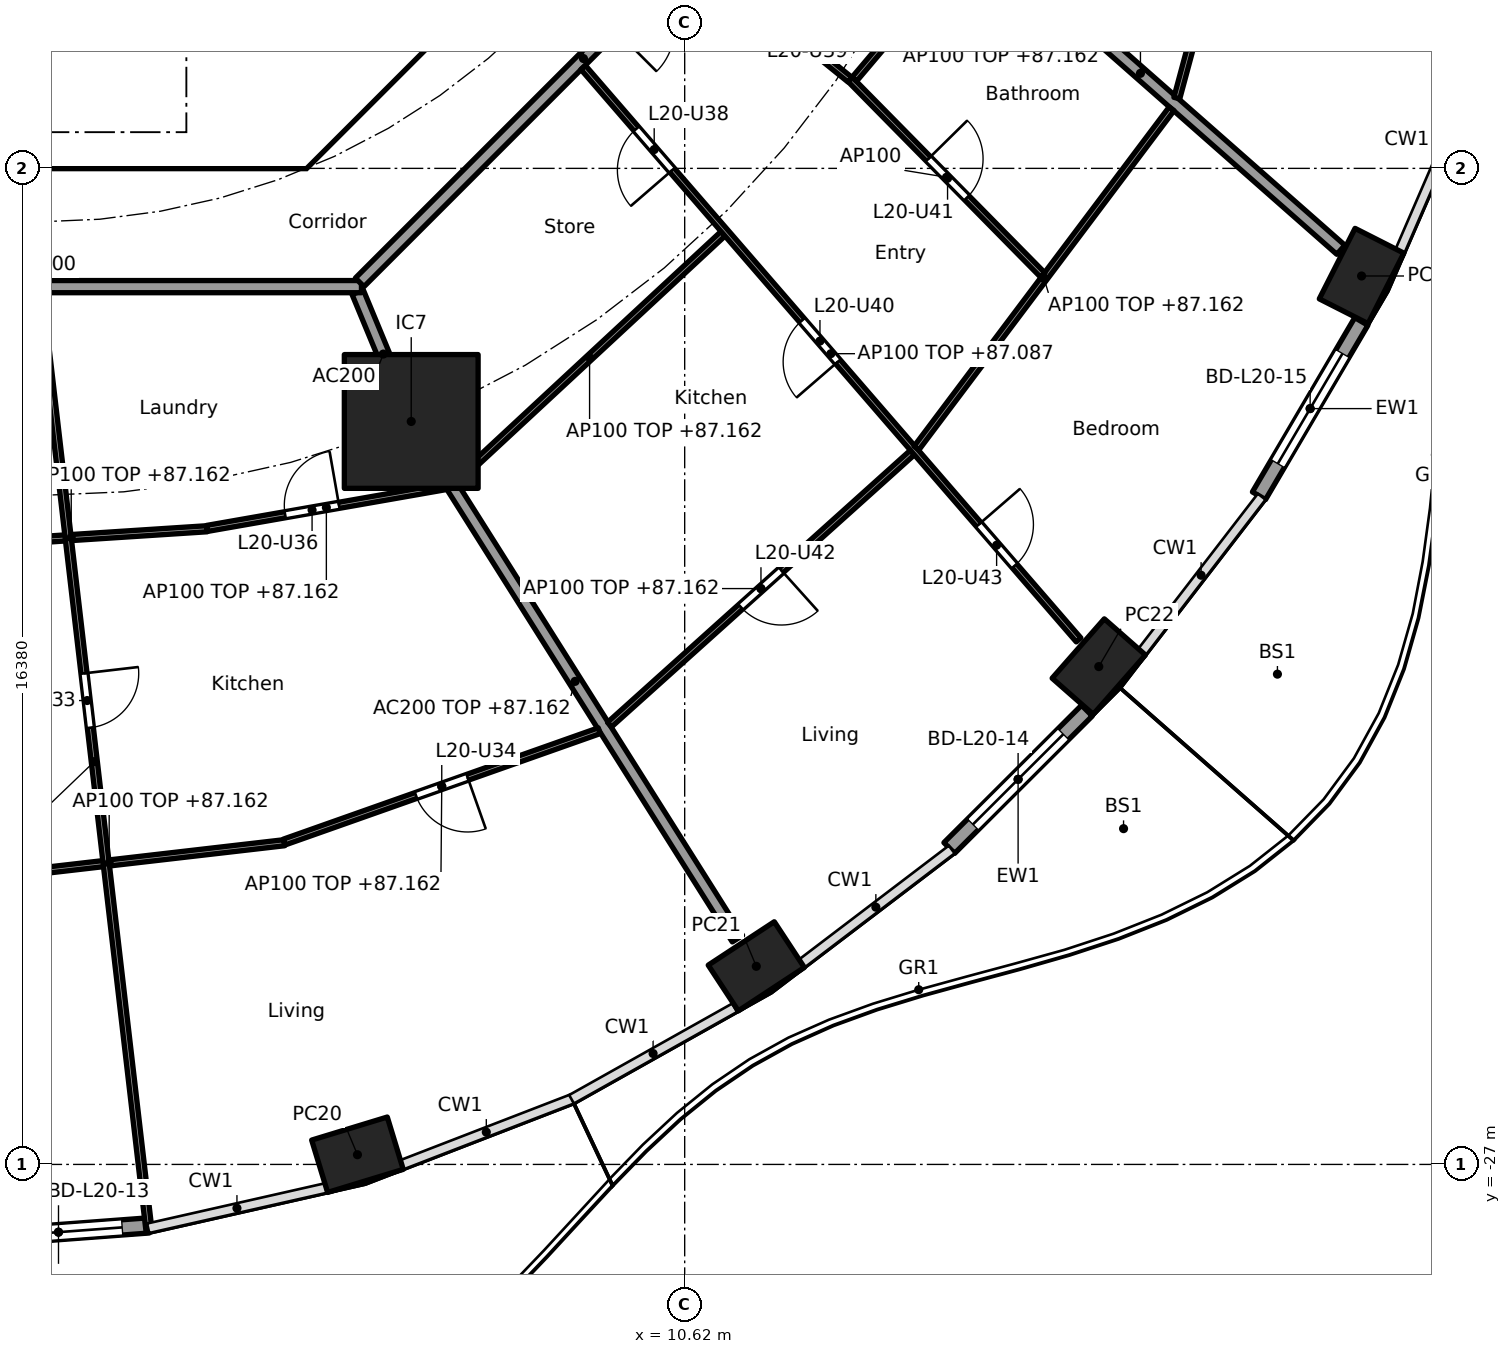
"""IFC4 building model, lengths in metres.
Left out: names, types, materials, properties, quantities, classifications, styles, units other than length and angle.
Written with IfcOpenShell. Run it as: python <this file> out.ifc"""

import sys

from ifc_helpers import new_model, si_unit, direction, frame, frame_2d, origin, origin_2d, place, context, subcontext, project, spatial, polyline, rectangle, hollow_rectangle, outline, extrude, element, fill, save


model = new_model("IFC4")
c1 = context("Model", 3, precision=1e-05, world=origin(), true_north=direction((0.0, 1.0)))
c2 = subcontext(c1, "Body", "Model", "MODEL_VIEW")
j1 = project(units=[si_unit("LENGTHUNIT", "METRE"), si_unit("PLANEANGLEUNIT", "RADIAN")], contexts=[c1])
p1 = place(None, origin())
s1 = spatial("IfcSite", under=j1, at=p1, CompositionType="ELEMENT")
p2 = place(p1, origin())
s2 = spatial("IfcBuilding", under=s1, at=p2, CompositionType="ELEMENT")
p3 = place(p2, frame((0.0, 0.0, 84.4)))
s3 = spatial("IfcBuildingStorey", under=s2, at=p3, CompositionType="ELEMENT", Elevation=84.4)
for number, where, z_axis, x_axis in (
    (1, (5.239, -26.841, 0.0), (0.0, 0.0, 1.0), (0.957, 0.292, 0.0)),
    (2, (11.798, -23.742, 0.0), (0.0, 0.0, 1.0), (0.836, 0.549, 0.0)),
    (3, (17.43, -18.813, 0.0), (0.0, 0.0, 1.0), (0.66, 0.751, 0.0)),
    (4, (21.751, -12.39, 0.0), (0.0, 0.0, 1.0), (0.452, 0.892, 0.0)),
):
    element("IfcColumn", number, at=place(p3, frame(where, z_axis=z_axis, x_axis=x_axis)), inside=s3, PredefinedType="COLUMN", context=c2, shape_type="SweptSolid", body=[
        extrude(hollow_rectangle(XDim=1.3, YDim=0.9, WallThickness=0.045, at=origin_2d()), origin(), (0.0, 0.0, 1.0), 3.7),
    ])
p4 = place(p3, frame((6.123, -14.782, 0.0), z_axis=(0.0, 0.0, 1.0), x_axis=(1.0, 0.0, 0.0)))
e5 = element("IfcColumn", 5, at=p4, inside=s3, PredefinedType="COLUMN", context=c2, shape_type="SweptSolid", body=[
    extrude(rectangle(XDim=2.2, YDim=2.2, at=origin_2d()), origin(), (0.0, 0.0, 1.0), 3.7),
])
p5 = place(p3, frame((1.806, -28.003, 0.0), z_axis=(0.0, 0.0, 1.0), x_axis=(-0.997226174467, -0.074430887117, 0.0)))
e6 = element("IfcWall", 6, at=p5, inside=s3, PredefinedType="SOLIDWALL", context=c2, shape_type="SweptSolid", body=[
    extrude(rectangle(XDim=2.975, YDim=0.25, at=frame_2d((1.488, 0.0))), origin(), (0.0, 0.0, 1.0), 3.44),
])
p6 = place(p5, frame((0.438, 0.0, 0.0)))
e7 = element("IfcOpeningElement", 7, at=p6, cuts=e6, PredefinedType="OPENING", context=c2, shape_type="SweptSolid", body=[
    extrude(rectangle(XDim=2.1, YDim=2.4, at=frame_2d((1.05, 1.2))), frame((0.0, 0.135, 0.0), z_axis=(0.0, -1.0, 0.0), x_axis=(1.0, 0.0, 0.0)), (0.0, 0.0, 1.0), 0.27),
])
p7 = place(p3, frame((17.235, -19.537, 0.0), z_axis=(0.0, 0.0, 1.0), x_axis=(-0.707793551437, -0.706419343269, 0.0)))
e8 = element("IfcWall", 8, at=p7, inside=s3, PredefinedType="SOLIDWALL", context=c2, shape_type="SweptSolid", body=[
    extrude(rectangle(XDim=3.198, YDim=0.25, at=frame_2d((1.599, 0.0))), origin(), (0.0, 0.0, 1.0), 3.44),
])
p8 = place(p7, frame((0.549, 0.0, 0.0)))
e9 = element("IfcOpeningElement", 9, at=p8, cuts=e8, PredefinedType="OPENING", context=c2, shape_type="SweptSolid", body=[
    extrude(rectangle(XDim=2.1, YDim=2.4, at=frame_2d((1.05, 1.2))), frame((0.0, 0.135, 0.0), z_axis=(0.0, -1.0, 0.0), x_axis=(1.0, 0.0, 0.0)), (0.0, 0.0, 1.0), 0.27),
])
p9 = place(p3, frame((21.748, -13.137, 0.0), z_axis=(0.0, 0.0, 1.0), x_axis=(-0.506297921217, -0.862358634775, 0.0)))
e10 = element("IfcWall", 10, at=p9, inside=s3, PredefinedType="SOLIDWALL", context=c2, shape_type="SweptSolid", body=[
    extrude(rectangle(XDim=3.325, YDim=0.25, at=frame_2d((1.662, 0.0))), origin(), (0.0, 0.0, 1.0), 3.44),
])
p10 = place(p9, frame((0.612, 0.0, 0.0)))
e11 = element("IfcOpeningElement", 11, at=p10, cuts=e10, PredefinedType="OPENING", context=c2, shape_type="SweptSolid", body=[
    extrude(rectangle(XDim=2.1, YDim=2.4, at=frame_2d((1.05, 1.2))), frame((0.0, 0.135, 0.0), z_axis=(0.0, -1.0, 0.0), x_axis=(1.0, 0.0, 0.0)), (0.0, 0.0, 1.0), 0.27),
])
p11 = place(p3, frame((4.613, -9.988, 0.0), z_axis=(0.0, 0.0, 1.0), x_axis=(0.707106781187, 0.707106781187, 0.0)))
e12 = element("IfcWall", 12, at=p11, inside=s3, PredefinedType="SHEAR", context=c2, shape_type="SweptSolid", body=[
    extrude(rectangle(XDim=7.602, YDim=0.6, at=frame_2d((3.801, 0.0))), origin(), (0.0, 0.0, 1.0), 3.44),
])
p12 = place(p11, frame((3.201, 0.0, 0.0)))
e13 = element("IfcOpeningElement", 13, at=p12, cuts=e12, PredefinedType="OPENING", context=c2, shape_type="SweptSolid", body=[
    extrude(rectangle(XDim=1.2, YDim=2.1, at=frame_2d((0.6, 1.05))), frame((0.0, 0.31, 0.0), z_axis=(0.0, -1.0, 0.0), x_axis=(1.0, 0.0, 0.0)), (0.0, 0.0, 1.0), 0.62),
])
p13 = place(p3, frame((4.0, -10.025, 0.0), z_axis=(0.0, 0.0, 1.0), x_axis=(0.0, 1.0, 0.0)))
e14 = element("IfcWall", 14, at=p13, inside=s3, PredefinedType="SOLIDWALL", context=c2, shape_type="SweptSolid", body=[
    extrude(rectangle(XDim=3.0, YDim=0.2, at=frame_2d((1.5, 0.0))), origin(), (0.0, 0.0, 1.0), 3.44),
])
p14 = place(p13, frame((0.975, 0.0, 0.0)))
e15 = element("IfcOpeningElement", 15, at=p14, cuts=e14, PredefinedType="OPENING", context=c2, shape_type="SweptSolid", body=[
    extrude(rectangle(XDim=1.1, YDim=2.1, at=frame_2d((0.55, 1.05))), frame((0.0, 0.11, 0.0), z_axis=(0.0, -1.0, 0.0), x_axis=(1.0, 0.0, 0.0)), (0.0, 0.0, 1.0), 0.22),
])
p15 = place(p3, origin())
e16 = element("IfcWall", 16, at=p15, inside=s3, PredefinedType="SHEAR", context=c2, shape_type="SweptSolid", body=[
    extrude(outline(polyline([(-4.152, -10.025), (4.152, -10.025), (4.401, -9.776), (4.825, -10.2), (4.401, -10.625), (-4.401, -10.625), (-4.825, -10.2), (-4.401, -9.776), (-4.152, -10.025)])), origin(), (0.0, 0.0, 1.0), 3.44),
])
p16 = place(p3, frame((5.243, -12.657, 0.0), z_axis=(0.0, 0.0, 1.0), x_axis=(0.382747093259, -0.923853160736, 0.0)))
e17 = element("IfcWall", 17, at=p16, inside=s3, PredefinedType="PARTITIONING", context=c2, shape_type="SweptSolid", body=[
    extrude(rectangle(XDim=2.2, YDim=0.2, at=frame_2d((1.1, 0.0))), origin(), (0.0, 0.0, 1.0), 3.44),
])
p17 = place(p3, frame((6.15, -14.824, 0.0), z_axis=(0.0, 0.0, 1.0), x_axis=(0.533492589682, -0.845804739142, 0.0)))
e18 = element("IfcWall", 18, at=p17, inside=s3, PredefinedType="PARTITIONING", context=c2, shape_type="SweptSolid", body=[
    extrude(rectangle(XDim=10.006, YDim=0.2, at=frame_2d((5.003, 0.0))), origin(), (0.0, 0.0, 1.0), 2.762),
])
p18 = place(p3, frame((14.82, -6.156, 0.0), z_axis=(0.0, 0.0, 1.0), x_axis=(0.750582231659, -0.660777052808, 0.0)))
e19 = element("IfcWall", 19, at=p18, inside=s3, PredefinedType="PARTITIONING", context=c2, shape_type="SweptSolid", body=[
    extrude(rectangle(XDim=8.781, YDim=0.2, at=frame_2d((4.391, 0.0))), origin(), (0.0, 0.0, 1.0), 2.762),
])
p19 = place(p3, frame((-5.104, -12.565, 0.0), z_axis=(0.0, 0.0, 1.0), x_axis=(1.0, 0.0, 0.0)))
e20 = element("IfcWall", 20, at=p19, inside=s3, PredefinedType="PARTITIONING", context=c2, shape_type="SweptSolid", body=[
    extrude(rectangle(XDim=10.409, YDim=0.2, at=frame_2d((5.205, 0.0))), origin(), (0.0, 0.0, 1.0), 3.44),
])
p20 = place(p3, frame((5.275, -12.494, 0.0), z_axis=(0.0, 0.0, 1.0), x_axis=(0.707106781187, 0.707106781187, 0.0)))
e21 = element("IfcWall", 21, at=p20, inside=s3, PredefinedType="PARTITIONING", context=c2, shape_type="SweptSolid", body=[
    extrude(rectangle(XDim=10.409, YDim=0.2, at=frame_2d((5.205, 0.0))), origin(), (0.0, 0.0, 1.0), 3.44),
])
p21 = place(p20, frame((5.906, 0.0, 0.0)))
e22 = element("IfcOpeningElement", 22, at=p21, cuts=e21, PredefinedType="OPENING", context=c2, shape_type="SweptSolid", body=[
    extrude(rectangle(XDim=1.0, YDim=2.1, at=frame_2d((0.5, 1.05))), frame((0.0, 0.11, 0.0), z_axis=(0.0, -1.0, 0.0), x_axis=(1.0, 0.0, 0.0)), (0.0, 0.0, 1.0), 0.22),
])
p22 = place(p3, frame((-1.703, -16.836, 0.0), z_axis=(0.0, 0.0, 1.0), x_axis=(0.997899919101, 0.064774620473, 0.0)))
e23 = element("IfcWall", 23, at=p22, inside=s3, PredefinedType="PARTITIONING", context=c2, shape_type="SweptSolid", body=[
    extrude(rectangle(XDim=4.478, YDim=0.1, at=frame_2d((2.239, 0.0))), origin(), (0.0, 0.0, 1.0), 2.762),
])
p23 = place(p3, frame((-1.726, -22.375, 0.0), z_axis=(0.0, 0.0, 1.0), x_axis=(0.993392336919, 0.114767874207, 0.0)))
e24 = element("IfcWall", 24, at=p23, inside=s3, PredefinedType="PARTITIONING", context=c2, shape_type="SweptSolid", body=[
    extrude(rectangle(XDim=5.801, YDim=0.1, at=frame_2d((2.9, 0.0))), origin(), (0.0, 0.0, 1.0), 2.762),
])
p24 = place(p3, frame((0.011, -12.664, 0.0), z_axis=(0.0, 0.0, 1.0), x_axis=(0.115841404661, -0.993267722704, 0.0)))
e25 = element("IfcWall", 25, at=p24, inside=s3, PredefinedType="PARTITIONING", context=c2, shape_type="SweptSolid", body=[
    extrude(rectangle(XDim=15.528, YDim=0.1, at=frame_2d((7.764, 0.0))), origin(), (0.0, 0.0, 1.0), 2.687),
])
p25 = place(p24, frame((6.303, 0.0, 0.0)))
e26 = element("IfcOpeningElement", 26, at=p25, cuts=e25, PredefinedType="OPENING", context=c2, shape_type="SweptSolid", body=[
    extrude(rectangle(XDim=0.9, YDim=2.1, at=frame_2d((0.45, 1.05))), frame((0.0, 0.06, 0.0), z_axis=(0.0, -1.0, 0.0), x_axis=(1.0, 0.0, 0.0)), (0.0, 0.0, 1.0), 0.12),
])
p26 = place(p3, frame((2.765, -16.541, 0.0), z_axis=(0.0, 0.0, 1.0), x_axis=(0.984998714702, 0.172561676036, 0.0)))
e27 = element("IfcWall", 27, at=p26, inside=s3, PredefinedType="PARTITIONING", context=c2, shape_type="SweptSolid", body=[
    extrude(rectangle(XDim=3.984, YDim=0.1, at=frame_2d((1.992, 0.0))), origin(), (0.0, 0.0, 1.0), 2.762),
])
p27 = place(p26, frame((1.304, 0.0, 0.0)))
e28 = element("IfcOpeningElement", 28, at=p27, cuts=e27, PredefinedType="OPENING", context=c2, shape_type="SweptSolid", body=[
    extrude(rectangle(XDim=0.9, YDim=2.1, at=frame_2d((0.45, 1.05))), frame((0.0, 0.06, 0.0), z_axis=(0.0, -1.0, 0.0), x_axis=(1.0, 0.0, 0.0)), (0.0, 0.0, 1.0), 0.12),
])
p28 = place(p3, frame((4.034, -21.698, 0.0), z_axis=(0.0, 0.0, 1.0), x_axis=(0.942861482644, 0.33318497047, 0.0)))
e29 = element("IfcWall", 29, at=p28, inside=s3, PredefinedType="PARTITIONING", context=c2, shape_type="SweptSolid", body=[
    extrude(rectangle(XDim=5.495, YDim=0.1, at=frame_2d((2.748, 0.0))), origin(), (0.0, 0.0, 1.0), 2.762),
])
p29 = place(p28, frame((2.297, 0.0, 0.0)))
e30 = element("IfcOpeningElement", 30, at=p29, cuts=e29, PredefinedType="OPENING", context=c2, shape_type="SweptSolid", body=[
    extrude(rectangle(XDim=0.9, YDim=2.1, at=frame_2d((0.45, 1.05))), frame((0.0, 0.06, 0.0), z_axis=(0.0, -1.0, 0.0), x_axis=(1.0, 0.0, 0.0)), (0.0, 0.0, 1.0), 0.12),
])
p30 = place(p3, frame((6.861, -15.768, 0.0), z_axis=(0.0, 0.0, 1.0), x_axis=(0.733011256509, 0.680216508056, 0.0)))
e31 = element("IfcWall", 31, at=p30, inside=s3, PredefinedType="PARTITIONING", context=c2, shape_type="SweptSolid", body=[
    extrude(rectangle(XDim=5.989, YDim=0.1, at=frame_2d((2.994, 0.0))), origin(), (0.0, 0.0, 1.0), 2.762),
])
p31 = place(p3, frame((9.384, -19.768, 0.0), z_axis=(0.0, 0.0, 1.0), x_axis=(0.74387407395, 0.668319805262, 0.0)))
e32 = element("IfcWall", 32, at=p31, inside=s3, PredefinedType="PARTITIONING", context=c2, shape_type="SweptSolid", body=[
    extrude(rectangle(XDim=6.695, YDim=0.1, at=frame_2d((3.348, 0.0))), origin(), (0.0, 0.0, 1.0), 2.762),
])
p32 = place(p31, frame((2.898, 0.0, 0.0)))
e33 = element("IfcOpeningElement", 33, at=p32, cuts=e32, PredefinedType="OPENING", context=c2, shape_type="SweptSolid", body=[
    extrude(rectangle(XDim=0.9, YDim=2.1, at=frame_2d((0.45, 1.05))), frame((0.0, 0.06, 0.0), z_axis=(0.0, -1.0, 0.0), x_axis=(1.0, 0.0, 0.0)), (0.0, 0.0, 1.0), 0.12),
])
p33 = place(p3, frame((8.95, -8.96, 0.0), z_axis=(0.0, 0.0, 1.0), x_axis=(0.65441081073, -0.756139200676, 0.0)))
e34 = element("IfcWall", 34, at=p33, inside=s3, PredefinedType="PARTITIONING", context=c2, shape_type="SweptSolid", body=[
    extrude(rectangle(XDim=12.451, YDim=0.1, at=frame_2d((6.226, 0.0))), origin(), (0.0, 0.0, 1.0), 2.687),
])
p34 = place(p33, frame((1.336, 0.0, 0.0)))
e35 = element("IfcOpeningElement", 35, at=p34, cuts=e34, PredefinedType="OPENING", context=c2, shape_type="SweptSolid", body=[
    extrude(rectangle(XDim=0.9, YDim=2.1, at=frame_2d((0.45, 1.05))), frame((0.0, 0.06, 0.0), z_axis=(0.0, -1.0, 0.0), x_axis=(1.0, 0.0, 0.0)), (0.0, 0.0, 1.0), 0.12),
])
p35 = place(p33, frame((5.501, 0.0, 0.0)))
e36 = element("IfcOpeningElement", 36, at=p35, cuts=e34, PredefinedType="OPENING", context=c2, shape_type="SweptSolid", body=[
    extrude(rectangle(XDim=0.9, YDim=2.1, at=frame_2d((0.45, 1.05))), frame((0.0, 0.06, 0.0), z_axis=(0.0, -1.0, 0.0), x_axis=(1.0, 0.0, 0.0)), (0.0, 0.0, 1.0), 0.12),
])
p36 = place(p33, frame((9.941, 0.0, 0.0)))
e37 = element("IfcOpeningElement", 37, at=p36, cuts=e34, PredefinedType="OPENING", context=c2, shape_type="SweptSolid", body=[
    extrude(rectangle(XDim=0.9, YDim=2.1, at=frame_2d((0.45, 1.05))), frame((0.0, 0.06, 0.0), z_axis=(0.0, -1.0, 0.0), x_axis=(1.0, 0.0, 0.0)), (0.0, 0.0, 1.0), 0.12),
])
p37 = place(p3, frame((14.432, -15.219, 0.0), z_axis=(0.0, 0.0, 1.0), x_axis=(0.601001256685, 0.799248077548, 0.0)))
e38 = element("IfcWall", 38, at=p37, inside=s3, PredefinedType="PARTITIONING", context=c2, shape_type="SweptSolid", body=[
    extrude(rectangle(XDim=6.98, YDim=0.1, at=frame_2d((3.49, 0.0))), origin(), (0.0, 0.0, 1.0), 2.762),
])
p38 = place(p3, frame((10.802, -7.107, 0.0), z_axis=(0.0, 0.0, 1.0), x_axis=(0.776992142502, -0.62951029419, 0.0)))
e39 = element("IfcWall", 39, at=p38, inside=s3, PredefinedType="PARTITIONING", context=c2, shape_type="SweptSolid", body=[
    extrude(rectangle(XDim=3.263, YDim=0.1, at=frame_2d((1.631, 0.0))), origin(), (0.0, 0.0, 1.0), 2.687),
])
p39 = place(p38, frame((1.181, 0.0, 0.0)))
e40 = element("IfcOpeningElement", 40, at=p39, cuts=e39, PredefinedType="OPENING", context=c2, shape_type="SweptSolid", body=[
    extrude(rectangle(XDim=0.9, YDim=2.1, at=frame_2d((0.45, 1.05))), frame((0.0, 0.06, 0.0), z_axis=(0.0, -1.0, 0.0), x_axis=(1.0, 0.0, 0.0)), (0.0, 0.0, 1.0), 0.12),
])
p40 = place(p3, frame((13.341, -9.157, 0.0), z_axis=(0.0, 0.0, 1.0), x_axis=(0.701624526877, -0.712546856904, 0.0)))
e41 = element("IfcWall", 41, at=p40, inside=s3, PredefinedType="PARTITIONING", context=c2, shape_type="SweptSolid", body=[
    extrude(rectangle(XDim=4.515, YDim=0.1, at=frame_2d((2.258, 0.0))), origin(), (0.0, 0.0, 1.0), 3.44),
])
p41 = place(p40, frame((1.833, 0.0, 0.0)))
e42 = element("IfcOpeningElement", 42, at=p41, cuts=e41, PredefinedType="OPENING", context=c2, shape_type="SweptSolid", body=[
    extrude(rectangle(XDim=0.9, YDim=2.1, at=frame_2d((0.45, 1.05))), frame((0.0, 0.06, 0.0), z_axis=(0.0, -1.0, 0.0), x_axis=(1.0, 0.0, 0.0)), (0.0, 0.0, 1.0), 0.12),
])
p42 = place(p3, frame((13.409, -9.155, 0.0), z_axis=(0.0, 0.0, 1.0), x_axis=(0.646130325831, 0.763227097293, 0.0)))
e43 = element("IfcWall", 43, at=p42, inside=s3, PredefinedType="PARTITIONING", context=c2, shape_type="SweptSolid", body=[
    extrude(rectangle(XDim=3.084, YDim=0.1, at=frame_2d((1.542, 0.0))), origin(), (0.0, 0.0, 1.0), 2.762),
])
p43 = place(p3, frame((18.713, -9.464, 0.0), z_axis=(0.0, 0.0, 1.0), x_axis=(0.260279646259, 0.965533275316, 0.0)))
e44 = element("IfcWall", 44, at=p43, inside=s3, PredefinedType="PARTITIONING", context=c2, shape_type="SweptSolid", body=[
    extrude(rectangle(XDim=5.833, YDim=0.1, at=frame_2d((2.917, 0.0))), origin(), (0.0, 0.0, 1.0), 2.762),
])
p44 = place(p6, origin())
e45 = element("IfcDoor", 45, at=p44, inside=s3, OperationType="SLIDING_TO_LEFT", PredefinedType="DOOR", context=c2, shape_type="SweptSolid", body=[
    extrude(rectangle(XDim=2.1, YDim=2.4, at=frame_2d((1.05, 1.2))), frame((0.0, 0.025, 0.0), z_axis=(0.0, -1.0, 0.0), x_axis=(1.0, 0.0, 0.0)), (0.0, 0.0, 1.0), 0.05),
])
fill(e7, e45)
p45 = place(p8, origin())
e46 = element("IfcDoor", 46, at=p45, inside=s3, OperationType="SLIDING_TO_LEFT", PredefinedType="DOOR", context=c2, shape_type="SweptSolid", body=[
    extrude(rectangle(XDim=2.1, YDim=2.4, at=frame_2d((1.05, 1.2))), frame((0.0, 0.025, 0.0), z_axis=(0.0, -1.0, 0.0), x_axis=(1.0, 0.0, 0.0)), (0.0, 0.0, 1.0), 0.05),
])
fill(e9, e46)
p46 = place(p10, origin())
e47 = element("IfcDoor", 47, at=p46, inside=s3, OperationType="SLIDING_TO_LEFT", PredefinedType="DOOR", context=c2, shape_type="SweptSolid", body=[
    extrude(rectangle(XDim=2.1, YDim=2.4, at=frame_2d((1.05, 1.2))), frame((0.0, 0.025, 0.0), z_axis=(0.0, -1.0, 0.0), x_axis=(1.0, 0.0, 0.0)), (0.0, 0.0, 1.0), 0.05),
])
fill(e11, e47)
p47 = place(p14, origin())
e48 = element("IfcDoor", 48, at=p47, inside=s3, OperationType="SINGLE_SWING_LEFT", PredefinedType="DOOR", context=c2, shape_type="SweptSolid", body=[
    extrude(rectangle(XDim=1.1, YDim=2.1, at=frame_2d((0.55, 1.05))), frame((0.0, 0.025, 0.0), z_axis=(0.0, -1.0, 0.0), x_axis=(1.0, 0.0, 0.0)), (0.0, 0.0, 1.0), 0.05),
])
fill(e15, e48)
p48 = place(p25, origin())
e49 = element("IfcDoor", 49, at=p48, inside=s3, OperationType="SINGLE_SWING_LEFT", PredefinedType="DOOR", context=c2, shape_type="SweptSolid", body=[
    extrude(rectangle(XDim=0.9, YDim=2.1, at=frame_2d((0.45, 1.05))), frame((0.0, 0.025, 0.0), z_axis=(0.0, -1.0, 0.0), x_axis=(1.0, 0.0, 0.0)), (0.0, 0.0, 1.0), 0.05),
])
fill(e26, e49)
p49 = place(p29, frame((0.9, 0.0, 0.0), x_axis=(-1.0, 0.0, 0.0)))
e50 = element("IfcDoor", 50, at=p49, inside=s3, OperationType="SINGLE_SWING_LEFT", PredefinedType="DOOR", context=c2, shape_type="SweptSolid", body=[
    extrude(rectangle(XDim=0.9, YDim=2.1, at=frame_2d((0.45, 1.05))), frame((0.0, 0.025, 0.0), z_axis=(0.0, -1.0, 0.0), x_axis=(1.0, 0.0, 0.0)), (0.0, 0.0, 1.0), 0.05),
])
fill(e30, e50)
p50 = place(p27, origin())
e51 = element("IfcDoor", 51, at=p50, inside=s3, OperationType="SINGLE_SWING_RIGHT", PredefinedType="DOOR", context=c2, shape_type="SweptSolid", body=[
    extrude(rectangle(XDim=0.9, YDim=2.1, at=frame_2d((0.45, 1.05))), frame((0.0, 0.025, 0.0), z_axis=(0.0, -1.0, 0.0), x_axis=(1.0, 0.0, 0.0)), (0.0, 0.0, 1.0), 0.05),
])
fill(e28, e51)
p51 = place(p34, frame((0.9, 0.0, 0.0), x_axis=(-1.0, 0.0, 0.0)))
e52 = element("IfcDoor", 52, at=p51, inside=s3, OperationType="SINGLE_SWING_LEFT", PredefinedType="DOOR", context=c2, shape_type="SweptSolid", body=[
    extrude(rectangle(XDim=0.9, YDim=2.1, at=frame_2d((0.45, 1.05))), frame((0.0, 0.025, 0.0), z_axis=(0.0, -1.0, 0.0), x_axis=(1.0, 0.0, 0.0)), (0.0, 0.0, 1.0), 0.05),
])
fill(e35, e52)
p52 = place(p35, frame((0.9, 0.0, 0.0), x_axis=(-1.0, 0.0, 0.0)))
e53 = element("IfcDoor", 53, at=p52, inside=s3, OperationType="SINGLE_SWING_LEFT", PredefinedType="DOOR", context=c2, shape_type="SweptSolid", body=[
    extrude(rectangle(XDim=0.9, YDim=2.1, at=frame_2d((0.45, 1.05))), frame((0.0, 0.025, 0.0), z_axis=(0.0, -1.0, 0.0), x_axis=(1.0, 0.0, 0.0)), (0.0, 0.0, 1.0), 0.05),
])
fill(e36, e53)
p53 = place(p41, origin())
e54 = element("IfcDoor", 54, at=p53, inside=s3, OperationType="SINGLE_SWING_LEFT", PredefinedType="DOOR", context=c2, shape_type="SweptSolid", body=[
    extrude(rectangle(XDim=0.9, YDim=2.1, at=frame_2d((0.45, 1.05))), frame((0.0, 0.025, 0.0), z_axis=(0.0, -1.0, 0.0), x_axis=(1.0, 0.0, 0.0)), (0.0, 0.0, 1.0), 0.05),
])
fill(e42, e54)
p54 = place(p32, frame((0.9, 0.0, 0.0), x_axis=(-1.0, 0.0, 0.0)))
e55 = element("IfcDoor", 55, at=p54, inside=s3, OperationType="SINGLE_SWING_LEFT", PredefinedType="DOOR", context=c2, shape_type="SweptSolid", body=[
    extrude(rectangle(XDim=0.9, YDim=2.1, at=frame_2d((0.45, 1.05))), frame((0.0, 0.025, 0.0), z_axis=(0.0, -1.0, 0.0), x_axis=(1.0, 0.0, 0.0)), (0.0, 0.0, 1.0), 0.05),
])
fill(e33, e55)
p55 = place(p36, origin())
e56 = element("IfcDoor", 56, at=p55, inside=s3, OperationType="SINGLE_SWING_LEFT", PredefinedType="DOOR", context=c2, shape_type="SweptSolid", body=[
    extrude(rectangle(XDim=0.9, YDim=2.1, at=frame_2d((0.45, 1.05))), frame((0.0, 0.025, 0.0), z_axis=(0.0, -1.0, 0.0), x_axis=(1.0, 0.0, 0.0)), (0.0, 0.0, 1.0), 0.05),
])
fill(e37, e56)
save(model, sys.argv[1])
